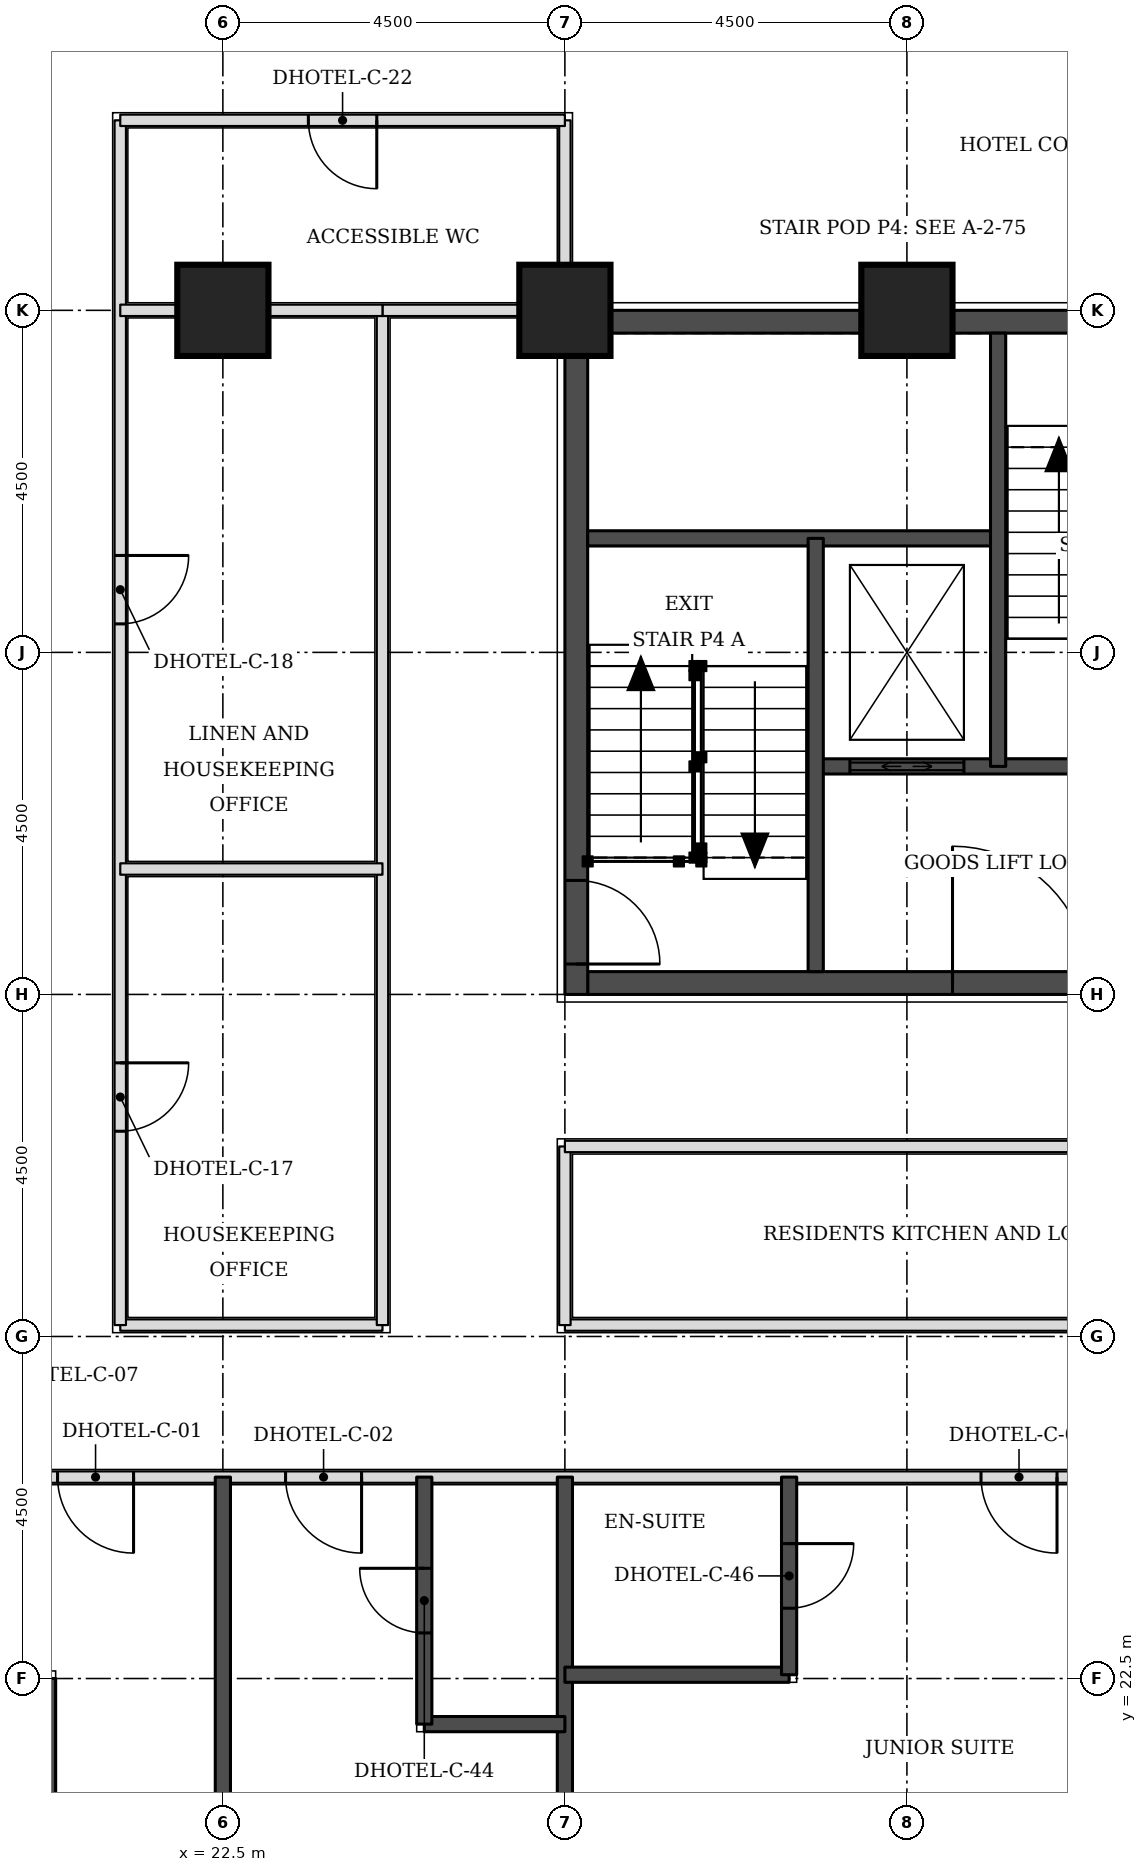
"""IFC4 building model, lengths in metres.
Left out: names, types, materials, properties, quantities, classifications, styles, units other than length and angle.
Written with IfcOpenShell. Run it as: python <this file> out.ifc"""

import sys

from ifc_helpers import new_model, si_unit, direction, frame, frame_2d, origin, origin_2d, place, context, subcontext, project, spatial, rectangle, extrude, element, fill, save


model = new_model("IFC4")
c1 = context("Model", 3, precision=1e-05, world=origin(), true_north=direction((0.0, 1.0)))
c2 = subcontext(c1, "Body", "Model", "MODEL_VIEW")
j1 = project(units=[si_unit("LENGTHUNIT", "METRE"), si_unit("PLANEANGLEUNIT", "RADIAN")], contexts=[c1])
p1 = place(None, origin())
s1 = spatial("IfcSite", under=j1, at=p1, CompositionType="ELEMENT")
p2 = place(p1, origin())
s2 = spatial("IfcBuilding", under=s1, at=p2, CompositionType="ELEMENT")
p3 = place(p2, frame((0.0, 0.0, 33.0)))
s3 = spatial("IfcBuildingStorey", under=s2, at=p3, CompositionType="ELEMENT", Elevation=33.0)
for number, where, z_axis, x_axis in (
    (1, (22.5, 40.5, 0.0), (0.0, 0.0, 1.0), (1.0, 0.0, 0.0)),
    (2, (27.0, 40.5, 0.0), (0.0, 0.0, 1.0), (1.0, 0.0, 0.0)),
    (3, (31.5, 40.5, 0.0), (0.0, 0.0, 1.0), (1.0, 0.0, 0.0)),
):
    element("IfcColumn", number, at=place(p3, frame(where, z_axis=z_axis, x_axis=x_axis)), inside=s3, PredefinedType="COLUMN", context=c2, shape_type="SweptSolid", body=[
        extrude(rectangle(XDim=1.2, YDim=1.2, at=origin_2d()), origin(), (0.0, 0.0, 1.0), 3.3),
    ])
p4 = place(p3, frame((27.3, 31.65, 0.0), z_axis=(0.0, 0.0, 1.0), x_axis=(1.0, 0.0, 0.0)))
e4 = element("IfcWall", 4, at=p4, inside=s3, PredefinedType="SHEAR", context=c2, shape_type="SweptSolid", body=[
    extrude(rectangle(XDim=8.4, YDim=0.3, at=frame_2d((4.2, 0.0))), origin(), (0.0, 0.0, 1.0), 3.3),
])
p5 = place(p4, frame((4.8, 0.0, 0.0)))
e5 = element("IfcOpeningElement", 5, at=p5, cuts=e4, PredefinedType="OPENING", context=c2, shape_type="SweptSolid", body=[
    extrude(rectangle(XDim=1.8, YDim=2.1, at=frame_2d((0.9, 1.05))), frame((0.0, 0.16, 0.0), z_axis=(0.0, -1.0, 0.0), x_axis=(1.0, 0.0, 0.0)), (0.0, 0.0, 1.0), 0.32),
])
p6 = place(p3, frame((27.3, 40.35, 0.0), z_axis=(0.0, 0.0, 1.0), x_axis=(1.0, 0.0, 0.0)))
e6 = element("IfcWall", 6, at=p6, inside=s3, PredefinedType="SHEAR", context=c2, shape_type="SweptSolid", body=[
    extrude(rectangle(XDim=8.4, YDim=0.3, at=frame_2d((4.2, 0.0))), origin(), (0.0, 0.0, 1.0), 3.3),
])
p7 = place(p6, frame((6.4, 0.0, 0.0)))
e7 = element("IfcOpeningElement", 7, at=p7, cuts=e6, PredefinedType="OPENING", context=c2, shape_type="SweptSolid", body=[
    extrude(rectangle(XDim=1.1, YDim=2.1, at=frame_2d((0.55, 1.05))), frame((0.0, 0.16, 0.0), z_axis=(0.0, -1.0, 0.0), x_axis=(1.0, 0.0, 0.0)), (0.0, 0.0, 1.0), 0.32),
])
p8 = place(p3, frame((27.15, 31.5, 0.0), z_axis=(0.0, 0.0, 1.0), x_axis=(0.0, 1.0, 0.0)))
e8 = element("IfcWall", 8, at=p8, inside=s3, PredefinedType="SHEAR", context=c2, shape_type="SweptSolid", body=[
    extrude(rectangle(XDim=9.0, YDim=0.3, at=frame_2d((4.5, 0.0))), origin(), (0.0, 0.0, 1.0), 3.3),
])
p9 = place(p8, frame((0.4, 0.0, 0.0)))
e9 = element("IfcOpeningElement", 9, at=p9, cuts=e8, PredefinedType="OPENING", context=c2, shape_type="SweptSolid", body=[
    extrude(rectangle(XDim=1.1, YDim=2.1, at=frame_2d((0.55, 1.05))), frame((0.0, 0.16, 0.0), z_axis=(0.0, -1.0, 0.0), x_axis=(1.0, 0.0, 0.0)), (0.0, 0.0, 1.0), 0.32),
])
p10 = place(p3, frame((19.15, 25.15, 0.0), z_axis=(0.0, 0.0, 1.0), x_axis=(1.0, 0.0, 0.0)))
e10 = element("IfcWall", 10, at=p10, inside=s3, PredefinedType="PARTITIONING", context=c2, shape_type="SweptSolid", body=[
    extrude(rectangle(XDim=33.7, YDim=0.15, at=frame_2d((16.85, 0.0))), origin(), (0.0, 0.0, 1.0), 3.08),
])
p11 = place(p10, frame((4.175, 0.0, 0.0)))
e11 = element("IfcOpeningElement", 11, at=p11, cuts=e10, PredefinedType="OPENING", context=c2, shape_type="SweptSolid", body=[
    extrude(rectangle(XDim=1.0, YDim=2.1, at=frame_2d((0.5, 1.05))), frame((0.0, 0.085, 0.0), z_axis=(0.0, -1.0, 0.0), x_axis=(1.0, 0.0, 0.0)), (0.0, 0.0, 1.0), 0.17),
])
p12 = place(p10, frame((13.325, 0.0, 0.0)))
e12 = element("IfcOpeningElement", 12, at=p12, cuts=e10, PredefinedType="OPENING", context=c2, shape_type="SweptSolid", body=[
    extrude(rectangle(XDim=1.0, YDim=2.1, at=frame_2d((0.5, 1.05))), frame((0.0, 0.085, 0.0), z_axis=(0.0, -1.0, 0.0), x_axis=(1.0, 0.0, 0.0)), (0.0, 0.0, 1.0), 0.17),
])
p13 = place(p10, frame((19.625, 0.0, 0.0)))
e13 = element("IfcOpeningElement", 13, at=p13, cuts=e10, PredefinedType="OPENING", context=c2, shape_type="SweptSolid", body=[
    extrude(rectangle(XDim=1.0, YDim=2.1, at=frame_2d((0.5, 1.05))), frame((0.0, 0.085, 0.0), z_axis=(0.0, -1.0, 0.0), x_axis=(1.0, 0.0, 0.0)), (0.0, 0.0, 1.0), 0.17),
])
p14 = place(p10, frame((28.775, 0.0, 0.0)))
e14 = element("IfcOpeningElement", 14, at=p14, cuts=e10, PredefinedType="OPENING", context=c2, shape_type="SweptSolid", body=[
    extrude(rectangle(XDim=1.0, YDim=2.1, at=frame_2d((0.5, 1.05))), frame((0.0, 0.085, 0.0), z_axis=(0.0, -1.0, 0.0), x_axis=(1.0, 0.0, 0.0)), (0.0, 0.0, 1.0), 0.17),
])
p15 = place(p10, frame((1.175, 0.0, 0.0)))
e15 = element("IfcOpeningElement", 15, at=p15, cuts=e10, PredefinedType="OPENING", context=c2, shape_type="SweptSolid", body=[
    extrude(rectangle(XDim=1.0, YDim=2.1, at=frame_2d((0.5, 1.05))), frame((0.0, 0.085, 0.0), z_axis=(0.0, -1.0, 0.0), x_axis=(1.0, 0.0, 0.0)), (0.0, 0.0, 1.0), 0.17),
])
p16 = place(p10, frame((31.525, 0.0, 0.0)))
e16 = element("IfcOpeningElement", 16, at=p16, cuts=e10, PredefinedType="OPENING", context=c2, shape_type="SweptSolid", body=[
    extrude(rectangle(XDim=1.0, YDim=2.1, at=frame_2d((0.5, 1.05))), frame((0.0, 0.085, 0.0), z_axis=(0.0, -1.0, 0.0), x_axis=(1.0, 0.0, 0.0)), (0.0, 0.0, 1.0), 0.17),
])
p17 = place(p3, frame((21.15, 27.15, 0.0), z_axis=(0.0, 0.0, 1.0), x_axis=(1.0, 0.0, 0.0)))
e17 = element("IfcWall", 17, at=p17, inside=s3, PredefinedType="PARTITIONING", context=c2, shape_type="SweptSolid", body=[
    extrude(rectangle(XDim=3.45, YDim=0.15, at=frame_2d((1.725, 0.0))), origin(), (0.0, 0.0, 1.0), 3.08),
])
p18 = place(p3, frame((21.15, 27.15, 0.0), z_axis=(0.0, 0.0, 1.0), x_axis=(0.0, 1.0, 0.0)))
e18 = element("IfcWall", 18, at=p18, inside=s3, PredefinedType="PARTITIONING", context=c2, shape_type="SweptSolid", body=[
    extrude(rectangle(XDim=15.85, YDim=0.15, at=frame_2d((7.925, 0.0))), origin(), (0.0, 0.0, 1.0), 3.08),
])
p19 = place(p18, frame((2.55, 0.0, 0.0)))
e19 = element("IfcOpeningElement", 19, at=p19, cuts=e18, PredefinedType="OPENING", context=c2, shape_type="SweptSolid", body=[
    extrude(rectangle(XDim=0.9, YDim=2.1, at=frame_2d((0.45, 1.05))), frame((0.0, 0.085, 0.0), z_axis=(0.0, -1.0, 0.0), x_axis=(1.0, 0.0, 0.0)), (0.0, 0.0, 1.0), 0.17),
])
p20 = place(p18, frame((9.225, 0.0, 0.0)))
e20 = element("IfcOpeningElement", 20, at=p20, cuts=e18, PredefinedType="OPENING", context=c2, shape_type="SweptSolid", body=[
    extrude(rectangle(XDim=0.9, YDim=2.1, at=frame_2d((0.45, 1.05))), frame((0.0, 0.085, 0.0), z_axis=(0.0, -1.0, 0.0), x_axis=(1.0, 0.0, 0.0)), (0.0, 0.0, 1.0), 0.17),
])
p21 = place(p3, frame((24.6, 27.15, 0.0), z_axis=(0.0, 0.0, 1.0), x_axis=(0.0, 1.0, 0.0)))
e21 = element("IfcWall", 21, at=p21, inside=s3, PredefinedType="PARTITIONING", context=c2, shape_type="SweptSolid", body=[
    extrude(rectangle(XDim=13.35, YDim=0.15, at=frame_2d((6.675, 0.0))), origin(), (0.0, 0.0, 1.0), 3.08),
])
p22 = place(p3, frame((27.0, 27.15, 0.0), z_axis=(0.0, 0.0, 1.0), x_axis=(1.0, 0.0, 0.0)))
e22 = element("IfcWall", 22, at=p22, inside=s3, PredefinedType="PARTITIONING", context=c2, shape_type="SweptSolid", body=[
    extrude(rectangle(XDim=11.5, YDim=0.15, at=frame_2d((5.75, 0.0))), origin(), (0.0, 0.0, 1.0), 3.08),
])
p23 = place(p3, frame((27.0, 27.15, 0.0), z_axis=(0.0, 0.0, 1.0), x_axis=(0.0, 1.0, 0.0)))
e23 = element("IfcWall", 23, at=p23, inside=s3, PredefinedType="PARTITIONING", context=c2, shape_type="SweptSolid", body=[
    extrude(rectangle(XDim=2.35, YDim=0.15, at=frame_2d((1.175, 0.0))), origin(), (0.0, 0.0, 1.0), 3.08),
])
p24 = place(p3, frame((27.0, 29.5, 0.0), z_axis=(0.0, 0.0, 1.0), x_axis=(1.0, 0.0, 0.0)))
e24 = element("IfcWall", 24, at=p24, inside=s3, PredefinedType="PARTITIONING", context=c2, shape_type="SweptSolid", body=[
    extrude(rectangle(XDim=9.0, YDim=0.15, at=frame_2d((4.5, 0.0))), origin(), (0.0, 0.0, 1.0), 3.08),
])
p25 = place(p3, frame((24.6, 40.5, 0.0), z_axis=(0.0, 0.0, 1.0), x_axis=(1.0, 0.0, 0.0)))
e25 = element("IfcWall", 25, at=p25, inside=s3, PredefinedType="PARTITIONING", context=c2, shape_type="SweptSolid", body=[
    extrude(rectangle(XDim=2.35, YDim=0.15, at=frame_2d((1.175, 0.0))), origin(), (0.0, 0.0, 1.0), 2.33),
])
p26 = place(p3, frame((27.0, 40.55, 0.0), z_axis=(0.0, 0.0, 1.0), x_axis=(0.0, 1.0, 0.0)))
e26 = element("IfcWall", 26, at=p26, inside=s3, PredefinedType="PARTITIONING", context=c2, shape_type="SweptSolid", body=[
    extrude(rectangle(XDim=2.45, YDim=0.15, at=frame_2d((1.225, 0.0))), origin(), (0.0, 0.0, 1.0), 3.08),
])
p27 = place(p3, frame((21.15, 43.0, 0.0), z_axis=(0.0, 0.0, 1.0), x_axis=(1.0, 0.0, 0.0)))
e27 = element("IfcWall", 27, at=p27, inside=s3, PredefinedType="PARTITIONING", context=c2, shape_type="SweptSolid", body=[
    extrude(rectangle(XDim=5.85, YDim=0.15, at=frame_2d((2.925, 0.0))), origin(), (0.0, 0.0, 1.0), 3.08),
])
p28 = place(p27, frame((2.475, 0.0, 0.0)))
e28 = element("IfcOpeningElement", 28, at=p28, cuts=e27, PredefinedType="OPENING", context=c2, shape_type="SweptSolid", body=[
    extrude(rectangle(XDim=0.9, YDim=2.1, at=frame_2d((0.45, 1.05))), frame((0.0, 0.085, 0.0), z_axis=(0.0, -1.0, 0.0), x_axis=(1.0, 0.0, 0.0)), (0.0, 0.0, 1.0), 0.17),
])
for number, where, z_axis, x_axis in (
    (29, (22.5, 18.6, 0.0), (0.0, 0.0, 1.0), (0.0, 1.0, 0.0)),
    (30, (27.0, 18.6, 0.0), (0.0, 0.0, 1.0), (0.0, 1.0, 0.0)),
):
    element("IfcWall", number, at=place(p3, frame(where, z_axis=z_axis, x_axis=x_axis)), inside=s3, PredefinedType="SOLIDWALL", context=c2, shape_type="SweptSolid", body=[
        extrude(rectangle(XDim=6.55, YDim=0.2, at=frame_2d((3.275, 0.0))), origin(), (0.0, 0.0, 1.0), 3.08),
    ])
p29 = place(p3, frame((20.2, 20.0, 0.0), z_axis=(0.0, 0.0, 1.0), x_axis=(0.0, 1.0, 0.0)))
e31 = element("IfcWall", 31, at=p29, inside=s3, PredefinedType="SOLIDWALL", context=c2, shape_type="SweptSolid", body=[
    extrude(rectangle(XDim=2.5, YDim=0.2, at=frame_2d((1.25, 0.0))), origin(), (0.0, 0.0, 1.0), 3.08),
])
p30 = place(p3, frame((25.15, 21.9, 0.0), z_axis=(0.0, 0.0, 1.0), x_axis=(1.0, 0.0, 0.0)))
e32 = element("IfcWall", 32, at=p30, inside=s3, PredefinedType="SOLIDWALL", context=c2, shape_type="SweptSolid", body=[
    extrude(rectangle(XDim=1.85, YDim=0.2, at=frame_2d((0.925, 0.0))), origin(), (0.0, 0.0, 1.0), 3.08),
])
p31 = place(p3, frame((25.15, 21.9, 0.0), z_axis=(0.0, 0.0, 1.0), x_axis=(0.0, 1.0, 0.0)))
e33 = element("IfcWall", 33, at=p31, inside=s3, PredefinedType="SOLIDWALL", context=c2, shape_type="SweptSolid", body=[
    extrude(rectangle(XDim=3.25, YDim=0.2, at=frame_2d((1.625, 0.0))), origin(), (0.0, 0.0, 1.0), 3.08),
])
p32 = place(p31, frame((1.2, 0.0, 0.0)))
e34 = element("IfcOpeningElement", 34, at=p32, cuts=e33, PredefinedType="OPENING", context=c2, shape_type="SweptSolid", body=[
    extrude(rectangle(XDim=0.85, YDim=2.1, at=frame_2d((0.425, 1.05))), frame((0.0, 0.11, 0.0), z_axis=(0.0, -1.0, 0.0), x_axis=(1.0, 0.0, 0.0)), (0.0, 0.0, 1.0), 0.22),
])
p33 = place(p3, frame((27.0, 22.55, 0.0), z_axis=(0.0, 0.0, 1.0), x_axis=(1.0, 0.0, 0.0)))
e35 = element("IfcWall", 35, at=p33, inside=s3, PredefinedType="SOLIDWALL", context=c2, shape_type="SweptSolid", body=[
    extrude(rectangle(XDim=2.95, YDim=0.2, at=frame_2d((1.475, 0.0))), origin(), (0.0, 0.0, 1.0), 3.08),
])
p34 = place(p3, frame((29.95, 22.55, 0.0), z_axis=(0.0, 0.0, 1.0), x_axis=(0.0, 1.0, 0.0)))
e36 = element("IfcWall", 36, at=p34, inside=s3, PredefinedType="SOLIDWALL", context=c2, shape_type="SweptSolid", body=[
    extrude(rectangle(XDim=2.6, YDim=0.2, at=frame_2d((1.3, 0.0))), origin(), (0.0, 0.0, 1.0), 3.08),
])
p35 = place(p34, frame((0.875, 0.0, 0.0)))
e37 = element("IfcOpeningElement", 37, at=p35, cuts=e36, PredefinedType="OPENING", context=c2, shape_type="SweptSolid", body=[
    extrude(rectangle(XDim=0.85, YDim=2.1, at=frame_2d((0.425, 1.05))), frame((0.0, 0.11, 0.0), z_axis=(0.0, -1.0, 0.0), x_axis=(1.0, 0.0, 0.0)), (0.0, 0.0, 1.0), 0.22),
])
p36 = place(p3, frame((21.15, 33.15, 0.0), z_axis=(0.0, 0.0, 1.0), x_axis=(1.0, 0.0, 0.0)))
e38 = element("IfcWall", 38, at=p36, inside=s3, PredefinedType="PARTITIONING", context=c2, shape_type="SweptSolid", body=[
    extrude(rectangle(XDim=3.45, YDim=0.15, at=frame_2d((1.725, 0.0))), origin(), (0.0, 0.0, 1.0), 3.08),
])
p37 = place(p3, frame((21.15, 40.5, 0.0), z_axis=(0.0, 0.0, 1.0), x_axis=(1.0, 0.0, 0.0)))
e39 = element("IfcWall", 39, at=p37, inside=s3, PredefinedType="PARTITIONING", context=c2, shape_type="SweptSolid", body=[
    extrude(rectangle(XDim=3.45, YDim=0.15, at=frame_2d((1.725, 0.0))), origin(), (0.0, 0.0, 1.0), 2.33),
])
p38 = place(p3, frame((30.3, 34.5, 0.0), z_axis=(0.0, 0.0, 1.0), x_axis=(1.0, 0.0, 0.0)))
e40 = element("IfcWall", 40, at=p38, inside=s3, PredefinedType="SOLIDWALL", context=c2, shape_type="SweptSolid", body=[
    extrude(rectangle(XDim=5.4, YDim=0.2, at=frame_2d((2.7, 0.0))), origin(), (0.0, 0.0, 1.0), 3.08),
])
p39 = place(p38, frame((0.45, 0.0, 0.0)))
e41 = element("IfcOpeningElement", 41, at=p39, cuts=e40, PredefinedType="OPENING", context=c2, shape_type="SweptSolid", body=[
    extrude(rectangle(XDim=1.5, YDim=2.1, at=frame_2d((0.75, 1.05))), frame((0.0, 0.11, 0.0), z_axis=(0.0, -1.0, 0.0), x_axis=(1.0, 0.0, 0.0)), (0.0, 0.0, 1.0), 0.22),
])
p40 = place(p3, frame((27.3, 37.5, 0.0), z_axis=(0.0, 0.0, 1.0), x_axis=(1.0, 0.0, 0.0)))
e42 = element("IfcWall", 42, at=p40, inside=s3, PredefinedType="SOLIDWALL", context=c2, shape_type="SweptSolid", body=[
    extrude(rectangle(XDim=5.4, YDim=0.2, at=frame_2d((2.7, 0.0))), origin(), (0.0, 0.0, 1.0), 3.08),
])
for number, where, z_axis, x_axis in (
    (43, (30.3, 31.8, 0.0), (0.0, 0.0, 1.0), (0.0, 1.0, 0.0)),
    (44, (32.7, 34.5, 0.0), (0.0, 0.0, 1.0), (0.0, 1.0, 0.0)),
):
    element("IfcWall", number, at=place(p3, frame(where, z_axis=z_axis, x_axis=x_axis)), inside=s3, PredefinedType="SOLIDWALL", context=c2, shape_type="SweptSolid", body=[
        extrude(rectangle(XDim=5.7, YDim=0.2, at=frame_2d((2.85, 0.0))), origin(), (0.0, 0.0, 1.0), 3.08),
    ])
p41 = place(p11, frame((1.0, 0.0, 0.0), z_axis=(0.0, 0.0, 1.0), x_axis=(-1.0, 0.0, 0.0)))
e45 = element("IfcDoor", 45, at=p41, inside=s3, OperationType="SINGLE_SWING_LEFT", PredefinedType="DOOR", context=c2, shape_type="SweptSolid", body=[
    extrude(rectangle(XDim=1.0, YDim=2.1, at=frame_2d((0.5, 1.05))), frame((0.0, 0.025, 0.0), z_axis=(0.0, -1.0, 0.0), x_axis=(1.0, 0.0, 0.0)), (0.0, 0.0, 1.0), 0.05),
])
fill(e11, e45)
p42 = place(p32, origin())
e46 = element("IfcDoor", 46, at=p42, inside=s3, OperationType="SINGLE_SWING_RIGHT", PredefinedType="DOOR", context=c2, shape_type="SweptSolid", body=[
    extrude(rectangle(XDim=0.85, YDim=2.1, at=frame_2d((0.425, 1.05))), frame((0.0, 0.025, 0.0), z_axis=(0.0, -1.0, 0.0), x_axis=(1.0, 0.0, 0.0)), (0.0, 0.0, 1.0), 0.05),
])
fill(e34, e46)
p43 = place(p12, frame((1.0, 0.0, 0.0), z_axis=(0.0, 0.0, 1.0), x_axis=(-1.0, 0.0, 0.0)))
e47 = element("IfcDoor", 47, at=p43, inside=s3, OperationType="SINGLE_SWING_LEFT", PredefinedType="DOOR", context=c2, shape_type="SweptSolid", body=[
    extrude(rectangle(XDim=1.0, YDim=2.1, at=frame_2d((0.5, 1.05))), frame((0.0, 0.025, 0.0), z_axis=(0.0, -1.0, 0.0), x_axis=(1.0, 0.0, 0.0)), (0.0, 0.0, 1.0), 0.05),
])
fill(e12, e47)
p44 = place(p35, frame((0.85, 0.0, 0.0), z_axis=(0.0, 0.0, 1.0), x_axis=(-1.0, 0.0, 0.0)))
e48 = element("IfcDoor", 48, at=p44, inside=s3, OperationType="SINGLE_SWING_LEFT", PredefinedType="DOOR", context=c2, shape_type="SweptSolid", body=[
    extrude(rectangle(XDim=0.85, YDim=2.1, at=frame_2d((0.425, 1.05))), frame((0.0, 0.025, 0.0), z_axis=(0.0, -1.0, 0.0), x_axis=(1.0, 0.0, 0.0)), (0.0, 0.0, 1.0), 0.05),
])
fill(e37, e48)
p45 = place(p15, frame((1.0, 0.0, 0.0), z_axis=(0.0, 0.0, 1.0), x_axis=(-1.0, 0.0, 0.0)))
e49 = element("IfcDoor", 49, at=p45, inside=s3, OperationType="SINGLE_SWING_LEFT", PredefinedType="DOOR", context=c2, shape_type="SweptSolid", body=[
    extrude(rectangle(XDim=1.0, YDim=2.1, at=frame_2d((0.5, 1.05))), frame((0.0, 0.025, 0.0), z_axis=(0.0, -1.0, 0.0), x_axis=(1.0, 0.0, 0.0)), (0.0, 0.0, 1.0), 0.05),
])
fill(e15, e49)
p46 = place(p19, frame((0.9, 0.0, 0.0), z_axis=(0.0, 0.0, 1.0), x_axis=(-1.0, 0.0, 0.0)))
e50 = element("IfcDoor", 50, at=p46, inside=s3, OperationType="SINGLE_SWING_LEFT", PredefinedType="DOOR", context=c2, shape_type="SweptSolid", body=[
    extrude(rectangle(XDim=0.9, YDim=2.1, at=frame_2d((0.45, 1.05))), frame((0.0, 0.025, 0.0), z_axis=(0.0, -1.0, 0.0), x_axis=(1.0, 0.0, 0.0)), (0.0, 0.0, 1.0), 0.05),
])
fill(e19, e50)
p47 = place(p20, frame((0.9, 0.0, 0.0), z_axis=(0.0, 0.0, 1.0), x_axis=(-1.0, 0.0, 0.0)))
e51 = element("IfcDoor", 51, at=p47, inside=s3, OperationType="SINGLE_SWING_LEFT", PredefinedType="DOOR", context=c2, shape_type="SweptSolid", body=[
    extrude(rectangle(XDim=0.9, YDim=2.1, at=frame_2d((0.45, 1.05))), frame((0.0, 0.025, 0.0), z_axis=(0.0, -1.0, 0.0), x_axis=(1.0, 0.0, 0.0)), (0.0, 0.0, 1.0), 0.05),
])
fill(e20, e51)
p48 = place(p28, frame((0.9, 0.0, 0.0), z_axis=(0.0, 0.0, 1.0), x_axis=(-1.0, 0.0, 0.0)))
e52 = element("IfcDoor", 52, at=p48, inside=s3, OperationType="SINGLE_SWING_LEFT", PredefinedType="DOOR", context=c2, shape_type="SweptSolid", body=[
    extrude(rectangle(XDim=0.9, YDim=2.1, at=frame_2d((0.45, 1.05))), frame((0.0, 0.025, 0.0), z_axis=(0.0, -1.0, 0.0), x_axis=(1.0, 0.0, 0.0)), (0.0, 0.0, 1.0), 0.05),
])
fill(e28, e52)
p49 = place(p9, frame((1.1, 0.0, 0.0), z_axis=(0.0, 0.0, 1.0), x_axis=(-1.0, 0.0, 0.0)))
e53 = element("IfcDoor", 53, at=p49, inside=s3, OperationType="SINGLE_SWING_RIGHT", PredefinedType="DOOR", context=c2, shape_type="SweptSolid", body=[
    extrude(rectangle(XDim=1.1, YDim=2.1, at=frame_2d((0.55, 1.05))), frame((0.0, 0.025, 0.0), z_axis=(0.0, -1.0, 0.0), x_axis=(1.0, 0.0, 0.0)), (0.0, 0.0, 1.0), 0.05),
])
fill(e9, e53)
p50 = place(p39, origin())
e54 = element("IfcDoor", 54, at=p50, inside=s3, OperationType="DOUBLE_DOOR_SLIDING", PredefinedType="DOOR", context=c2, shape_type="SweptSolid", body=[
    extrude(rectangle(XDim=1.5, YDim=2.1, at=frame_2d((0.75, 1.05))), frame((0.0, 0.025, 0.0), z_axis=(0.0, -1.0, 0.0), x_axis=(1.0, 0.0, 0.0)), (0.0, 0.0, 1.0), 0.05),
])
fill(e41, e54)
p51 = place(p5, origin())
e55 = element("IfcDoor", 55, at=p51, inside=s3, OperationType="SINGLE_SWING_LEFT", PredefinedType="DOOR", context=c2, shape_type="SweptSolid", body=[
    extrude(rectangle(XDim=1.8, YDim=2.1, at=frame_2d((0.9, 1.05))), frame((0.0, 0.025, 0.0), z_axis=(0.0, -1.0, 0.0), x_axis=(1.0, 0.0, 0.0)), (0.0, 0.0, 1.0), 0.05),
])
fill(e5, e55)
save(model, sys.argv[1])
